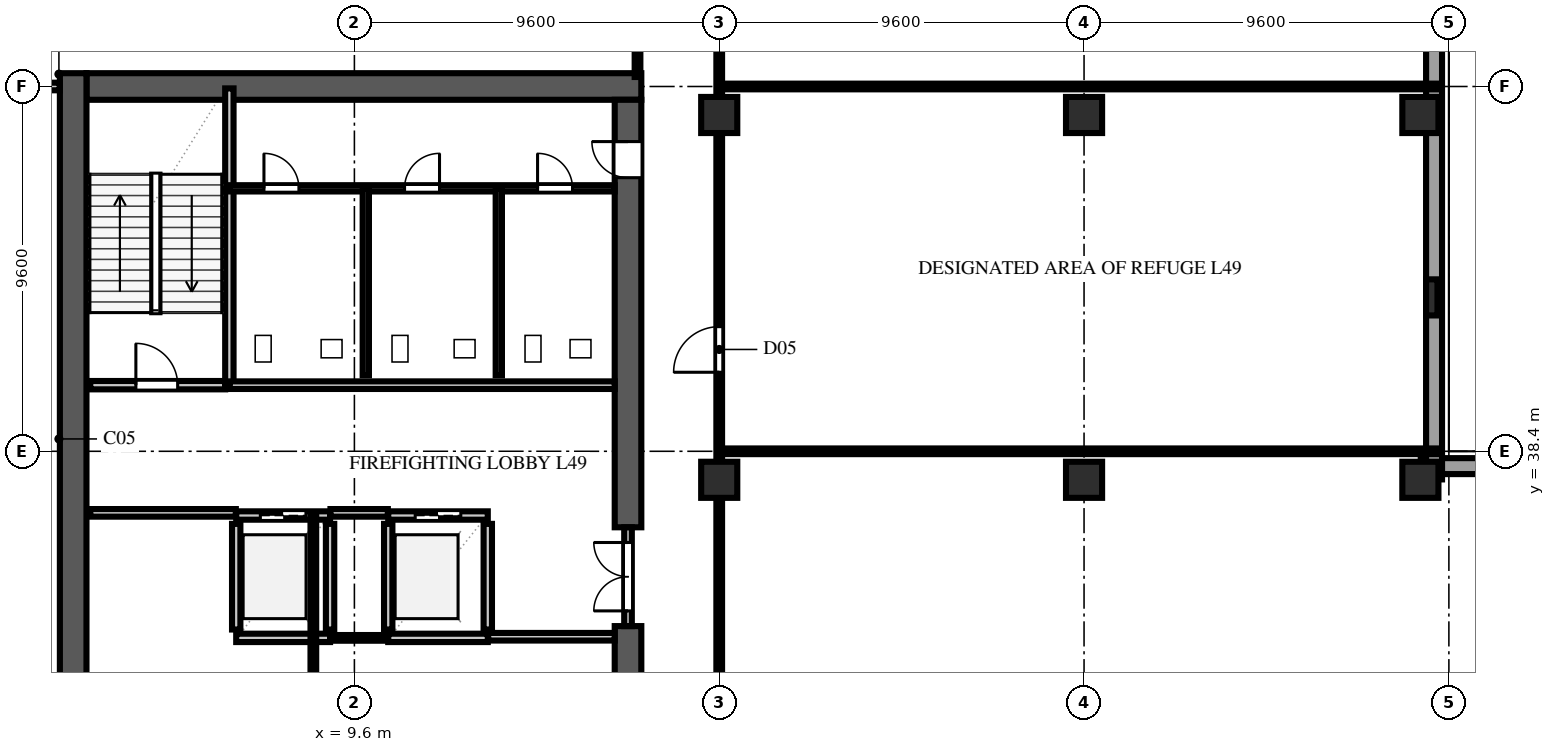
"""IFC4 building model, lengths in metres.
Left out: names, types, materials, properties, quantities, classifications, styles, units other than length and angle.
Written with IfcOpenShell. Run it as: python <this file> out.ifc"""

import sys

from ifc_helpers import new_model, si_unit, direction, frame, frame_2d, origin, origin_2d, place, context, subcontext, project, spatial, rectangle, extrude, element, fill, save


model = new_model("IFC4")
c1 = context("Model", 3, precision=1e-05, world=origin(), true_north=direction((0.0, 1.0)))
c2 = subcontext(c1, "Body", "Model", "MODEL_VIEW")
j1 = project(units=[si_unit("LENGTHUNIT", "METRE"), si_unit("PLANEANGLEUNIT", "RADIAN")], contexts=[c1])
p1 = place(None, origin())
s1 = spatial("IfcSite", under=j1, at=p1, CompositionType="ELEMENT")
p2 = place(p1, origin())
s2 = spatial("IfcBuilding", under=s1, at=p2, CompositionType="ELEMENT")
p3 = place(p2, frame((0.0, 0.0, 194.0)))
s3 = spatial("IfcBuildingStorey", under=s2, at=p3, CompositionType="ELEMENT", Elevation=194.0)
p4 = place(p3, frame((2.55, 48.0, 0.0), z_axis=(0.0, 0.0, 1.0), x_axis=(1.0, 0.0, 0.0)))
e1 = element("IfcWall", 1, at=p4, inside=s3, PredefinedType="SHEAR", context=c2, shape_type="SweptSolid", body=[
    extrude(rectangle(XDim=14.6, YDim=0.7, at=frame_2d((7.3, 0.0))), origin(), (0.0, 0.0, 1.0), 4.74),
])
p5 = place(p3, frame((2.2, 9.25, 0.0), z_axis=(0.0, 0.0, 1.0), x_axis=(0.0, 1.0, 0.0)))
e2 = element("IfcWall", 2, at=p5, inside=s3, PredefinedType="SHEAR", context=c2, shape_type="SweptSolid", body=[
    extrude(rectangle(XDim=39.1, YDim=0.7, at=frame_2d((19.55, 0.0))), origin(), (0.0, 0.0, 1.0), 4.74),
])
p6 = place(p3, frame((16.8, 26.0, 0.0), z_axis=(0.0, 0.0, 1.0), x_axis=(0.0, 1.0, 0.0)))
e3 = element("IfcWall", 3, at=p6, inside=s3, PredefinedType="SHEAR", context=c2, shape_type="SweptSolid", body=[
    extrude(rectangle(XDim=7.8, YDim=0.7, at=frame_2d((3.9, 0.0))), origin(), (0.0, 0.0, 1.0), 4.74),
])
p7 = place(p3, frame((16.8, 36.4, 0.0), z_axis=(0.0, 0.0, 1.0), x_axis=(0.0, 1.0, 0.0)))
e4 = element("IfcWall", 4, at=p7, inside=s3, PredefinedType="SHEAR", context=c2, shape_type="SweptSolid", body=[
    extrude(rectangle(XDim=11.25, YDim=0.7, at=frame_2d((5.625, 0.0))), origin(), (0.0, 0.0, 1.0), 4.74),
])
p8 = place(p7, frame((9.2, 0.0, 0.0)))
e5 = element("IfcOpeningElement", 5, at=p8, cuts=e4, PredefinedType="OPENING", context=c2, shape_type="SweptSolid", body=[
    extrude(rectangle(XDim=0.95, YDim=2.15, at=frame_2d((0.475, 1.075))), frame((0.0, 0.362, 0.0), z_axis=(0.0, -1.0, 0.0), x_axis=(1.0, 0.0, 0.0)), (0.0, 0.0, 1.0), 0.724),
])
for number, where, z_axis, x_axis in (
    (6, (19.2, 37.65, 0.0), (0.0, 0.0, 1.0), (1.0, 0.0, 0.0)),
    (7, (19.2, 47.25, 0.0), (0.0, 0.0, 1.0), (1.0, 0.0, 0.0)),
    (8, (28.8, 37.65, 0.0), (0.0, 0.0, 1.0), (1.0, 0.0, 0.0)),
    (9, (28.8, 47.25, 0.0), (0.0, 0.0, 1.0), (1.0, 0.0, 0.0)),
    (10, (37.65, 37.65, 0.0), (0.0, 0.0, 1.0), (1.0, 0.0, 0.0)),
    (11, (37.65, 47.25, 0.0), (0.0, 0.0, 1.0), (1.0, 0.0, 0.0)),
):
    element("IfcColumn", number, at=place(p3, frame(where, z_axis=z_axis, x_axis=x_axis)), inside=s3, PredefinedType="COLUMN", context=c2, shape_type="SweptSolid", body=[
        extrude(rectangle(XDim=0.95, YDim=0.95, at=origin_2d()), origin(), (0.0, 0.0, 1.0), 5.0),
    ])
p9 = place(p3, frame((37.95, 42.45, 0.0), z_axis=(0.0, 0.0, 1.0), x_axis=(0.0, 1.0, 0.0)))
e12 = element("IfcColumn", 12, at=p9, inside=s3, PredefinedType="PILASTER", context=c2, shape_type="SweptSolid", body=[
    extrude(rectangle(XDim=0.95, YDim=0.3, at=origin_2d()), origin(), (0.0, 0.0, 1.0), 5.0),
])
p10 = place(p3, frame((55.76, 38.01, 0.0), z_axis=(0.0, 0.0, 1.0), x_axis=(-1.0, 0.0, 0.0)))
e13 = element("IfcWall", 13, at=p10, inside=s3, PredefinedType="SOLIDWALL", context=c2, shape_type="SweptSolid", body=[
    extrude(rectangle(XDim=18.1, YDim=0.42, at=frame_2d((9.05, 0.0))), origin(), (0.0, 0.0, 1.0), 4.74),
])
p11 = place(p3, frame((38.01, 37.66, 0.0), z_axis=(0.0, 0.0, 1.0), x_axis=(0.0, 1.0, 0.0)))
e14 = element("IfcWall", 14, at=p11, inside=s3, PredefinedType="SOLIDWALL", context=c2, shape_type="SweptSolid", body=[
    extrude(rectangle(XDim=27.7, YDim=0.42, at=frame_2d((13.85, 0.0))), origin(), (0.0, 0.0, 1.0), 4.74),
])
p12 = place(p3, frame((2.65, 40.14, 0.0), z_axis=(0.0, 0.0, 1.0), x_axis=(1.0, 0.0, 0.0)))
e15 = element("IfcWall", 15, at=p12, inside=s3, PredefinedType="SOLIDWALL", context=c2, shape_type="SweptSolid", body=[
    extrude(rectangle(XDim=3.55, YDim=0.22, at=frame_2d((1.775, 0.0))), origin(), (0.0, 0.0, 1.0), 4.74),
])
p13 = place(p12, frame((1.2, 0.0, 0.0)))
e16 = element("IfcOpeningElement", 16, at=p13, cuts=e15, PredefinedType="OPENING", context=c2, shape_type="SweptSolid", body=[
    extrude(rectangle(XDim=1.1, YDim=2.2, at=frame_2d((0.55, 1.1))), frame((0.0, 0.122, 0.0), z_axis=(0.0, -1.0, 0.0), x_axis=(1.0, 0.0, 0.0)), (0.0, 0.0, 1.0), 0.244),
])
p14 = place(p3, frame((6.31, 40.14, 0.0), z_axis=(0.0, 0.0, 1.0), x_axis=(0.0, 1.0, 0.0)))
e17 = element("IfcWall", 17, at=p14, inside=s3, PredefinedType="SOLIDWALL", context=c2, shape_type="SweptSolid", body=[
    extrude(rectangle(XDim=7.81, YDim=0.22, at=frame_2d((3.905, 0.0))), origin(), (0.0, 0.0, 1.0), 4.74),
])
for number, where, z_axis, x_axis in (
    (18, (6.49, 33.71, 0.0), (0.0, 0.0, 1.0), (0.0, 1.0, 0.0)),
    (19, (8.96, 33.71, 0.0), (0.0, 0.0, 1.0), (0.0, 1.0, 0.0)),
):
    element("IfcWall", number, at=place(p3, frame(where, z_axis=z_axis, x_axis=x_axis)), inside=s3, PredefinedType="SOLIDWALL", context=c2, shape_type="SweptSolid", body=[
        extrude(rectangle(XDim=2.78, YDim=0.22, at=frame_2d((1.39, 0.0))), origin(), (0.0, 0.0, 1.0), 4.74),
    ])
p15 = place(p3, frame((6.49, 33.49, 0.0), z_axis=(0.0, 0.0, 1.0), x_axis=(1.0, 0.0, 0.0)))
e20 = element("IfcWall", 20, at=p15, inside=s3, PredefinedType="SOLIDWALL", context=c2, shape_type="SweptSolid", body=[
    extrude(rectangle(XDim=2.47, YDim=0.22, at=frame_2d((1.235, 0.0))), origin(), (0.0, 0.0, 1.0), 4.74),
])
p16 = place(p3, frame((6.49, 36.71, 0.0), z_axis=(0.0, 0.0, 1.0), x_axis=(1.0, 0.0, 0.0)))
e21 = element("IfcWall", 21, at=p16, inside=s3, PredefinedType="SOLIDWALL", context=c2, shape_type="SweptSolid", body=[
    extrude(rectangle(XDim=2.47, YDim=0.22, at=frame_2d((1.235, 0.0))), origin(), (0.0, 0.0, 1.0), 4.74),
])
p17 = place(p16, frame((0.635, 0.0, 0.0)))
e22 = element("IfcOpeningElement", 22, at=p17, cuts=e21, PredefinedType="OPENING", context=c2, shape_type="SweptSolid", body=[
    extrude(rectangle(XDim=1.2, YDim=2.2, at=frame_2d((0.6, 1.1))), frame((0.0, 0.122, 0.0), z_axis=(0.0, -1.0, 0.0), x_axis=(1.0, 0.0, 0.0)), (0.0, 0.0, 1.0), 0.244),
])
for number, where, z_axis, x_axis in (
    (23, (10.49, 33.71, 0.0), (0.0, 0.0, 1.0), (0.0, 1.0, 0.0)),
    (24, (13.11, 33.71, 0.0), (0.0, 0.0, 1.0), (0.0, 1.0, 0.0)),
):
    element("IfcWall", number, at=place(p3, frame(where, z_axis=z_axis, x_axis=x_axis)), inside=s3, PredefinedType="SOLIDWALL", context=c2, shape_type="SweptSolid", body=[
        extrude(rectangle(XDim=2.78, YDim=0.22, at=frame_2d((1.39, 0.0))), origin(), (0.0, 0.0, 1.0), 4.74),
    ])
p18 = place(p3, frame((10.49, 33.49, 0.0), z_axis=(0.0, 0.0, 1.0), x_axis=(1.0, 0.0, 0.0)))
e25 = element("IfcWall", 25, at=p18, inside=s3, PredefinedType="SOLIDWALL", context=c2, shape_type="SweptSolid", body=[
    extrude(rectangle(XDim=2.62, YDim=0.22, at=frame_2d((1.31, 0.0))), origin(), (0.0, 0.0, 1.0), 4.74),
])
p19 = place(p3, frame((10.49, 36.71, 0.0), z_axis=(0.0, 0.0, 1.0), x_axis=(1.0, 0.0, 0.0)))
e26 = element("IfcWall", 26, at=p19, inside=s3, PredefinedType="SOLIDWALL", context=c2, shape_type="SweptSolid", body=[
    extrude(rectangle(XDim=2.62, YDim=0.22, at=frame_2d((1.31, 0.0))), origin(), (0.0, 0.0, 1.0), 4.74),
])
p20 = place(p19, frame((0.71, 0.0, 0.0)))
e27 = element("IfcOpeningElement", 27, at=p20, cuts=e26, PredefinedType="OPENING", context=c2, shape_type="SweptSolid", body=[
    extrude(rectangle(XDim=1.2, YDim=2.2, at=frame_2d((0.6, 1.1))), frame((0.0, 0.122, 0.0), z_axis=(0.0, -1.0, 0.0), x_axis=(1.0, 0.0, 0.0)), (0.0, 0.0, 1.0), 0.244),
])
p21 = place(p3, frame((2.65, 36.78, 0.0), z_axis=(0.0, 0.0, 1.0), x_axis=(1.0, 0.0, 0.0)))
e28 = element("IfcWall", 28, at=p21, inside=s3, PredefinedType="SOLIDWALL", context=c2, shape_type="SweptSolid", body=[
    extrude(rectangle(XDim=3.83, YDim=0.2, at=frame_2d((1.915, 0.0))), origin(), (0.0, 0.0, 1.0), 4.74),
])
p22 = place(p3, frame((8.97, 36.78, 0.0), z_axis=(0.0, 0.0, 1.0), x_axis=(1.0, 0.0, 0.0)))
e29 = element("IfcWall", 29, at=p22, inside=s3, PredefinedType="SOLIDWALL", context=c2, shape_type="SweptSolid", body=[
    extrude(rectangle(XDim=1.51, YDim=0.2, at=frame_2d((0.755, 0.0))), origin(), (0.0, 0.0, 1.0), 4.74),
])
p23 = place(p3, frame((13.12, 33.52, 0.0), z_axis=(0.0, 0.0, 1.0), x_axis=(1.0, 0.0, 0.0)))
e30 = element("IfcWall", 30, at=p23, inside=s3, PredefinedType="SOLIDWALL", context=c2, shape_type="SweptSolid", body=[
    extrude(rectangle(XDim=3.33, YDim=0.2, at=frame_2d((1.665, 0.0))), origin(), (0.0, 0.0, 1.0), 4.74),
])
p24 = place(p3, frame((6.32, 40.14, 0.0), z_axis=(0.0, 0.0, 1.0), x_axis=(1.0, 0.0, 0.0)))
e31 = element("IfcWall", 31, at=p24, inside=s3, PredefinedType="SOLIDWALL", context=c2, shape_type="SweptSolid", body=[
    extrude(rectangle(XDim=10.13, YDim=0.2, at=frame_2d((5.065, 0.0))), origin(), (0.0, 0.0, 1.0), 4.74),
])
p25 = place(p3, frame((16.8, 33.8, 0.0), z_axis=(0.0, 0.0, 1.0), x_axis=(0.0, 1.0, 0.0)))
e32 = element("IfcWall", 32, at=p25, inside=s3, PredefinedType="SOLIDWALL", context=c2, shape_type="SweptSolid", body=[
    extrude(rectangle(XDim=2.6, YDim=0.2, at=frame_2d((1.3, 0.0))), origin(), (0.0, 0.0, 1.0), 4.74),
])
p26 = place(p25, frame((0.4, 0.0, 0.0)))
e33 = element("IfcOpeningElement", 33, at=p26, cuts=e32, PredefinedType="OPENING", context=c2, shape_type="SweptSolid", body=[
    extrude(rectangle(XDim=1.8, YDim=2.2, at=frame_2d((0.9, 1.1))), frame((0.0, 0.112, 0.0), z_axis=(0.0, -1.0, 0.0), x_axis=(1.0, 0.0, 0.0)), (0.0, 0.0, 1.0), 0.224),
])
p27 = place(p3, frame((8.965, 33.49, 0.0), z_axis=(0.0, 0.0, 1.0), x_axis=(1.0, 0.0, 0.0)))
e34 = element("IfcWall", 34, at=p27, inside=s3, PredefinedType="PARTITIONING", context=c2, shape_type="SweptSolid", body=[
    extrude(rectangle(XDim=1.52, YDim=0.15, at=frame_2d((0.76, 0.0))), origin(), (0.0, 0.0, 1.0), 4.74),
])
p28 = place(p3, frame((8.52, 12.02, 0.0), z_axis=(0.0, 0.0, 1.0), x_axis=(0.0, 1.0, 0.0)))
e35 = element("IfcWall", 35, at=p28, inside=s3, PredefinedType="PARTITIONING", context=c2, shape_type="SweptSolid", body=[
    extrude(rectangle(XDim=24.76, YDim=0.15, at=frame_2d((12.38, 0.0))), origin(), (0.0, 0.0, 1.0), 4.74),
])
p29 = place(p28, frame((6.0, 0.0, 0.0)))
e36 = element("IfcOpeningElement", 36, at=p29, cuts=e35, PredefinedType="OPENING", context=c2, shape_type="SweptSolid", body=[
    extrude(rectangle(XDim=1.8, YDim=2.2, at=frame_2d((0.9, 1.1))), frame((0.0, 0.087, 0.0), z_axis=(0.0, -1.0, 0.0), x_axis=(1.0, 0.0, 0.0)), (0.0, 0.0, 1.0), 0.174),
])
p30 = place(p3, frame((6.32, 45.32, 0.0), z_axis=(0.0, 0.0, 1.0), x_axis=(1.0, 0.0, 0.0)))
e37 = element("IfcWall", 37, at=p30, inside=s3, PredefinedType="PLUMBINGWALL", context=c2, shape_type="SweptSolid", body=[
    extrude(rectangle(XDim=10.13, YDim=0.165, at=frame_2d((5.065, 0.0))), origin(), (0.0, 0.0, 1.0), 4.74),
])
p31 = place(p30, frame((0.9, 0.0, 0.0)))
e38 = element("IfcOpeningElement", 38, at=p31, cuts=e37, PredefinedType="OPENING", context=c2, shape_type="SweptSolid", body=[
    extrude(rectangle(XDim=0.92, YDim=2.15, at=frame_2d((0.46, 1.075))), frame((0.0, 0.094, 0.0), z_axis=(0.0, -1.0, 0.0), x_axis=(1.0, 0.0, 0.0)), (0.0, 0.0, 1.0), 0.189),
])
p32 = place(p30, frame((4.6, 0.0, 0.0)))
e39 = element("IfcOpeningElement", 39, at=p32, cuts=e37, PredefinedType="OPENING", context=c2, shape_type="SweptSolid", body=[
    extrude(rectangle(XDim=0.92, YDim=2.15, at=frame_2d((0.46, 1.075))), frame((0.0, 0.094, 0.0), z_axis=(0.0, -1.0, 0.0), x_axis=(1.0, 0.0, 0.0)), (0.0, 0.0, 1.0), 0.189),
])
p33 = place(p30, frame((8.1, 0.0, 0.0)))
e40 = element("IfcOpeningElement", 40, at=p33, cuts=e37, PredefinedType="OPENING", context=c2, shape_type="SweptSolid", body=[
    extrude(rectangle(XDim=0.92, YDim=2.15, at=frame_2d((0.46, 1.075))), frame((0.0, 0.094, 0.0), z_axis=(0.0, -1.0, 0.0), x_axis=(1.0, 0.0, 0.0)), (0.0, 0.0, 1.0), 0.189),
])
for number, where, z_axis, x_axis in (
    (41, (9.9, 40.4, 0.0), (0.0, 0.0, 1.0), (0.0, 1.0, 0.0)),
    (42, (13.4, 40.4, 0.0), (0.0, 0.0, 1.0), (0.0, 1.0, 0.0)),
):
    element("IfcWall", number, at=place(p3, frame(where, z_axis=z_axis, x_axis=x_axis)), inside=s3, PredefinedType="PLUMBINGWALL", context=c2, shape_type="SweptSolid", body=[
        extrude(rectangle(XDim=4.92, YDim=0.165, at=frame_2d((2.46, 0.0))), origin(), (0.0, 0.0, 1.0), 4.74),
    ])
p34 = place(p3, frame((0.85, 48.0, 0.0), z_axis=(0.0, 0.0, 1.0), x_axis=(1.0, 0.0, 0.0)))
e43 = element("IfcWall", 43, at=p34, inside=s3, PredefinedType="SOLIDWALL", context=c2, shape_type="SweptSolid", body=[
    extrude(rectangle(XDim=0.995, YDim=0.2, at=frame_2d((0.498, 0.0))), origin(), (0.0, 0.0, 1.0), 4.74),
])
for number, where, z_axis, x_axis in (
    (44, (19.2, 38.4, 0.0), (0.0, 0.0, 1.0), (1.0, 0.0, 0.0)),
    (45, (19.2, 48.0, 0.0), (0.0, 0.0, 1.0), (1.0, 0.0, 0.0)),
):
    element("IfcWall", number, at=place(p3, frame(where, z_axis=z_axis, x_axis=x_axis)), inside=s3, PredefinedType="PARTITIONING", context=c2, shape_type="SweptSolid", body=[
        extrude(rectangle(XDim=18.98, YDim=0.15, at=frame_2d((9.49, 0.0))), origin(), (0.0, 0.0, 1.0), 4.74),
    ])
p35 = place(p3, frame((19.2, 9.98, 0.0), z_axis=(0.0, 0.0, 1.0), x_axis=(0.0, 1.0, 0.0)))
e46 = element("IfcWall", 46, at=p35, inside=s3, PredefinedType="PARTITIONING", context=c2, shape_type="SweptSolid", body=[
    extrude(rectangle(XDim=46.87, YDim=0.15, at=frame_2d((23.435, 0.0))), origin(), (0.0, 0.0, 1.0), 3.967),
])
p36 = place(p35, frame((2.0, 0.0, 0.0)))
e47 = element("IfcOpeningElement", 47, at=p36, cuts=e46, PredefinedType="OPENING", context=c2, shape_type="SweptSolid", body=[
    extrude(rectangle(XDim=1.8, YDim=2.2, at=frame_2d((0.9, 1.1))), frame((0.0, 0.087, 0.0), z_axis=(0.0, -1.0, 0.0), x_axis=(1.0, 0.0, 0.0)), (0.0, 0.0, 1.0), 0.174),
])
p37 = place(p35, frame((12.0, 0.0, 0.0)))
e48 = element("IfcOpeningElement", 48, at=p37, cuts=e46, PredefinedType="OPENING", context=c2, shape_type="SweptSolid", body=[
    extrude(rectangle(XDim=1.8, YDim=2.2, at=frame_2d((0.9, 1.1))), frame((0.0, 0.087, 0.0), z_axis=(0.0, -1.0, 0.0), x_axis=(1.0, 0.0, 0.0)), (0.0, 0.0, 1.0), 0.174),
])
p38 = place(p35, frame((30.5, 0.0, 0.0)))
e49 = element("IfcOpeningElement", 49, at=p38, cuts=e46, PredefinedType="OPENING", context=c2, shape_type="SweptSolid", body=[
    extrude(rectangle(XDim=1.2, YDim=2.2, at=frame_2d((0.6, 1.1))), frame((0.0, 0.087, 0.0), z_axis=(0.0, -1.0, 0.0), x_axis=(1.0, 0.0, 0.0)), (0.0, 0.0, 1.0), 0.174),
])
p39 = place(p35, frame((40.5, 0.0, 0.0)))
e50 = element("IfcOpeningElement", 50, at=p39, cuts=e46, PredefinedType="OPENING", context=c2, shape_type="SweptSolid", body=[
    extrude(rectangle(XDim=1.8, YDim=2.2, at=frame_2d((0.9, 1.1))), frame((0.0, 0.087, 0.0), z_axis=(0.0, -1.0, 0.0), x_axis=(1.0, 0.0, 0.0)), (0.0, 0.0, 1.0), 0.174),
])
p40 = place(p3, frame((17.05, 48.25, 0.0), z_axis=(0.0, 0.0, 1.0), x_axis=(0.0, 1.0, 0.0)))
e51 = element("IfcWall", 51, at=p40, inside=s3, PredefinedType="PARTITIONING", context=c2, shape_type="SweptSolid", body=[
    extrude(rectangle(XDim=18.73, YDim=0.15, at=frame_2d((9.365, 0.0))), origin(), (0.0, 0.0, 1.0), 4.7),
])
p41 = place(p40, frame((2.2, 0.0, 0.0)))
e52 = element("IfcOpeningElement", 52, at=p41, cuts=e51, PredefinedType="OPENING", context=c2, shape_type="SweptSolid", body=[
    extrude(rectangle(XDim=1.8, YDim=2.2, at=frame_2d((0.9, 1.1))), frame((0.0, 0.087, 0.0), z_axis=(0.0, -1.0, 0.0), x_axis=(1.0, 0.0, 0.0)), (0.0, 0.0, 1.0), 0.174),
])
p42 = place(p13, origin())
e53 = element("IfcDoor", 53, at=p42, inside=s3, OperationType="SINGLE_SWING_LEFT", PredefinedType="DOOR", context=c2, shape_type="SweptSolid", body=[
    extrude(rectangle(XDim=1.1, YDim=2.2, at=frame_2d((0.55, 1.1))), frame((0.0, 0.025, 0.0), z_axis=(0.0, -1.0, 0.0), x_axis=(1.0, 0.0, 0.0)), (0.0, 0.0, 1.0), 0.05),
])
fill(e16, e53)
p43 = place(p17, origin())
e54 = element("IfcDoor", 54, at=p43, inside=s3, OperationType="DOUBLE_DOOR_SLIDING", PredefinedType="DOOR", context=c2, shape_type="SweptSolid", body=[
    extrude(rectangle(XDim=1.2, YDim=2.2, at=frame_2d((0.6, 1.1))), frame((0.0, 0.025, 0.0), z_axis=(0.0, -1.0, 0.0), x_axis=(1.0, 0.0, 0.0)), (0.0, 0.0, 1.0), 0.05),
])
fill(e22, e54)
p44 = place(p20, origin())
e55 = element("IfcDoor", 55, at=p44, inside=s3, OperationType="DOUBLE_DOOR_SLIDING", PredefinedType="DOOR", context=c2, shape_type="SweptSolid", body=[
    extrude(rectangle(XDim=1.2, YDim=2.2, at=frame_2d((0.6, 1.1))), frame((0.0, 0.025, 0.0), z_axis=(0.0, -1.0, 0.0), x_axis=(1.0, 0.0, 0.0)), (0.0, 0.0, 1.0), 0.05),
])
fill(e27, e55)
p45 = place(p8, origin())
e56 = element("IfcDoor", 56, at=p45, inside=s3, OperationType="SINGLE_SWING_RIGHT", PredefinedType="DOOR", context=c2, shape_type="SweptSolid", body=[
    extrude(rectangle(XDim=0.95, YDim=2.15, at=frame_2d((0.475, 1.075))), frame((0.0, 0.025, 0.0), z_axis=(0.0, -1.0, 0.0), x_axis=(1.0, 0.0, 0.0)), (0.0, 0.0, 1.0), 0.05),
])
fill(e5, e56)
p46 = place(p26, origin())
e57 = element("IfcDoor", 57, at=p46, inside=s3, OperationType="DOUBLE_DOOR_SINGLE_SWING", PredefinedType="DOOR", context=c2, shape_type="SweptSolid", body=[
    extrude(rectangle(XDim=1.8, YDim=2.2, at=frame_2d((0.9, 1.1))), frame((0.0, 0.025, 0.0), z_axis=(0.0, -1.0, 0.0), x_axis=(1.0, 0.0, 0.0)), (0.0, 0.0, 1.0), 0.05),
])
fill(e33, e57)
p47 = place(p31, origin())
e58 = element("IfcDoor", 58, at=p47, inside=s3, OperationType="SINGLE_SWING_LEFT", PredefinedType="DOOR", context=c2, shape_type="SweptSolid", body=[
    extrude(rectangle(XDim=0.92, YDim=2.15, at=frame_2d((0.46, 1.075))), frame((0.0, 0.025, 0.0), z_axis=(0.0, -1.0, 0.0), x_axis=(1.0, 0.0, 0.0)), (0.0, 0.0, 1.0), 0.05),
])
fill(e38, e58)
p48 = place(p32, origin())
e59 = element("IfcDoor", 59, at=p48, inside=s3, OperationType="SINGLE_SWING_RIGHT", PredefinedType="DOOR", context=c2, shape_type="SweptSolid", body=[
    extrude(rectangle(XDim=0.92, YDim=2.15, at=frame_2d((0.46, 1.075))), frame((0.0, 0.025, 0.0), z_axis=(0.0, -1.0, 0.0), x_axis=(1.0, 0.0, 0.0)), (0.0, 0.0, 1.0), 0.05),
])
fill(e39, e59)
p49 = place(p33, origin())
e60 = element("IfcDoor", 60, at=p49, inside=s3, OperationType="SINGLE_SWING_LEFT", PredefinedType="DOOR", context=c2, shape_type="SweptSolid", body=[
    extrude(rectangle(XDim=0.92, YDim=2.15, at=frame_2d((0.46, 1.075))), frame((0.0, 0.025, 0.0), z_axis=(0.0, -1.0, 0.0), x_axis=(1.0, 0.0, 0.0)), (0.0, 0.0, 1.0), 0.05),
])
fill(e40, e60)
p50 = place(p38, origin())
e61 = element("IfcDoor", 61, at=p50, inside=s3, OperationType="SINGLE_SWING_LEFT", PredefinedType="DOOR", context=c2, shape_type="SweptSolid", body=[
    extrude(rectangle(XDim=1.2, YDim=2.2, at=frame_2d((0.6, 1.1))), frame((0.0, 0.025, 0.0), z_axis=(0.0, -1.0, 0.0), x_axis=(1.0, 0.0, 0.0)), (0.0, 0.0, 1.0), 0.05),
])
fill(e49, e61)
save(model, sys.argv[1])
